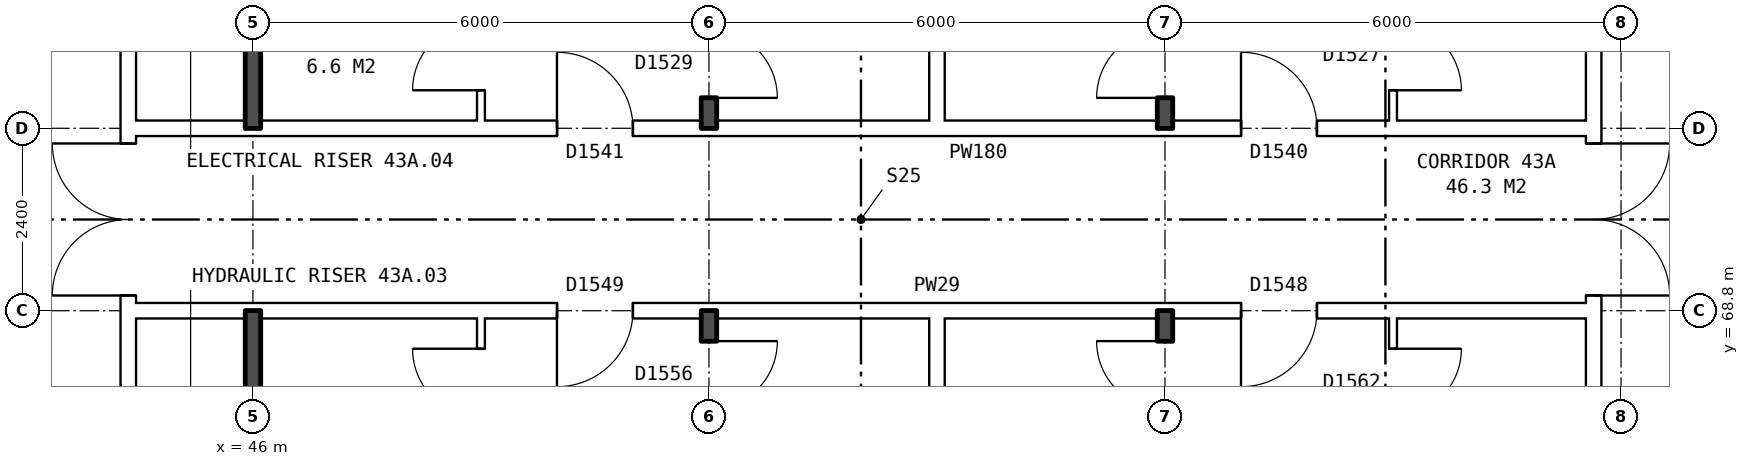
"""IFC4 building model, lengths in metres.
Left out: names, types, materials, properties, quantities, classifications, styles, units other than length and angle.
Written with IfcOpenShell. Run it as: python <this file> out.ifc"""

import sys

from ifc_helpers import new_model, si_unit, direction, frame, frame_2d, origin, place, context, subcontext, project, spatial, rectangle, extrude, element, fill, save


model = new_model("IFC4")
c1 = context("Model", 3, precision=1e-05, world=origin(), true_north=direction((0.0, 1.0)))
c2 = subcontext(c1, "Body", "Model", "MODEL_VIEW")
j1 = project(units=[si_unit("LENGTHUNIT", "METRE"), si_unit("PLANEANGLEUNIT", "RADIAN")], contexts=[c1])
p1 = place(None, origin())
s1 = spatial("IfcSite", under=j1, at=p1, CompositionType="ELEMENT")
p2 = place(p1, origin())
s2 = spatial("IfcBuilding", under=s1, at=p2, CompositionType="ELEMENT")
p3 = place(p2, frame((0.0, 0.0, 154.7)))
s3 = spatial("IfcBuildingStorey", under=s2, at=p3, CompositionType="ELEMENT", Elevation=154.7)
p4 = place(p3, frame((63.64, 63.9, 0.0), z_axis=(0.0, 0.0, 1.0), x_axis=(0.0, 1.0, 0.0)))
e1 = element("IfcWall", 1, at=p4, inside=s3, PredefinedType="PARTITIONING", context=c2, shape_type="SweptSolid", body=[
    extrude(rectangle(XDim=12.2, YDim=0.2, at=frame_2d((6.1, 0.0))), origin(), (0.0, 0.0, 1.0), 2.85),
])
p5 = place(p4, frame((5.1, 0.0, 0.0)))
e2 = element("IfcOpeningElement", 2, at=p5, cuts=e1, PredefinedType="OPENING", context=c2, shape_type="SweptSolid", body=[
    extrude(rectangle(XDim=2.0, YDim=2.1, at=frame_2d((1.0, 1.05))), frame((0.0, 0.11, 0.0), z_axis=(0.0, -1.0, 0.0), x_axis=(1.0, 0.0, 0.0)), (0.0, 0.0, 1.0), 0.22),
])
p6 = place(p3, frame((44.36, 63.9, 0.0), z_axis=(0.0, 0.0, 1.0), x_axis=(0.0, 1.0, 0.0)))
e3 = element("IfcWall", 3, at=p6, inside=s3, PredefinedType="PARTITIONING", context=c2, shape_type="SweptSolid", body=[
    extrude(rectangle(XDim=12.2, YDim=0.2, at=frame_2d((6.1, 0.0))), origin(), (0.0, 0.0, 1.0), 2.85),
])
p7 = place(p6, frame((5.1, 0.0, 0.0)))
e4 = element("IfcOpeningElement", 4, at=p7, cuts=e3, PredefinedType="OPENING", context=c2, shape_type="SweptSolid", body=[
    extrude(rectangle(XDim=2.0, YDim=2.1, at=frame_2d((1.0, 1.05))), frame((0.0, 0.11, 0.0), z_axis=(0.0, -1.0, 0.0), x_axis=(1.0, 0.0, 0.0)), (0.0, 0.0, 1.0), 0.22),
])
p8 = place(p3, frame((44.36, 68.8, 0.0), z_axis=(0.0, 0.0, 1.0), x_axis=(1.0, 0.0, 0.0)))
e5 = element("IfcWall", 5, at=p8, inside=s3, PredefinedType="PARTITIONING", context=c2, shape_type="SweptSolid", body=[
    extrude(rectangle(XDim=19.28, YDim=0.2, at=frame_2d((9.64, 0.0))), origin(), (0.0, 0.0, 1.0), 2.85),
])
p9 = place(p8, frame((14.64, 0.0, 0.0)))
e6 = element("IfcOpeningElement", 6, at=p9, cuts=e5, PredefinedType="OPENING", context=c2, shape_type="SweptSolid", body=[
    extrude(rectangle(XDim=1.0, YDim=2.1, at=frame_2d((0.5, 1.05))), frame((0.0, 0.11, 0.0), z_axis=(0.0, -1.0, 0.0), x_axis=(1.0, 0.0, 0.0)), (0.0, 0.0, 1.0), 0.22),
])
p10 = place(p8, frame((5.64, 0.0, 0.0)))
e7 = element("IfcOpeningElement", 7, at=p10, cuts=e5, PredefinedType="OPENING", context=c2, shape_type="SweptSolid", body=[
    extrude(rectangle(XDim=1.0, YDim=2.1, at=frame_2d((0.5, 1.05))), frame((0.0, 0.11, 0.0), z_axis=(0.0, -1.0, 0.0), x_axis=(1.0, 0.0, 0.0)), (0.0, 0.0, 1.0), 0.22),
])
p11 = place(p3, frame((44.36, 71.2, 0.0), z_axis=(0.0, 0.0, 1.0), x_axis=(1.0, 0.0, 0.0)))
e8 = element("IfcWall", 8, at=p11, inside=s3, PredefinedType="PARTITIONING", context=c2, shape_type="SweptSolid", body=[
    extrude(rectangle(XDim=19.28, YDim=0.2, at=frame_2d((9.64, 0.0))), origin(), (0.0, 0.0, 1.0), 2.85),
])
p12 = place(p11, frame((14.64, 0.0, 0.0)))
e9 = element("IfcOpeningElement", 9, at=p12, cuts=e8, PredefinedType="OPENING", context=c2, shape_type="SweptSolid", body=[
    extrude(rectangle(XDim=1.0, YDim=2.1, at=frame_2d((0.5, 1.05))), frame((0.0, 0.11, 0.0), z_axis=(0.0, -1.0, 0.0), x_axis=(1.0, 0.0, 0.0)), (0.0, 0.0, 1.0), 0.22),
])
p13 = place(p11, frame((5.64, 0.0, 0.0)))
e10 = element("IfcOpeningElement", 10, at=p13, cuts=e8, PredefinedType="OPENING", context=c2, shape_type="SweptSolid", body=[
    extrude(rectangle(XDim=1.0, YDim=2.1, at=frame_2d((0.5, 1.05))), frame((0.0, 0.11, 0.0), z_axis=(0.0, -1.0, 0.0), x_axis=(1.0, 0.0, 0.0)), (0.0, 0.0, 1.0), 0.22),
])
for number, where, z_axis, x_axis in (
    (11, (46.0, 63.8, 0.0), (0.0, 0.0, 1.0), (0.0, 1.0, 0.0)),
    (12, (46.0, 71.2, 0.0), (0.0, 0.0, 1.0), (0.0, 1.0, 0.0)),
):
    element("IfcWall", number, at=place(p3, frame(where, z_axis=z_axis, x_axis=x_axis)), inside=s3, PredefinedType="SOLIDWALL", context=c2, shape_type="SweptSolid", body=[
        extrude(rectangle(XDim=5.0, YDim=0.2, at=frame_2d((2.5, 0.0))), origin(), (0.0, 0.0, 1.0), 2.85),
    ])
p14 = place(p3, frame((49.0, 54.36, 0.0), z_axis=(0.0, 0.0, 1.0), x_axis=(0.0, 1.0, 0.0)))
e13 = element("IfcWall", 13, at=p14, inside=s3, PredefinedType="PARTITIONING", context=c2, shape_type="SweptSolid", body=[
    extrude(rectangle(XDim=14.34, YDim=0.1, at=frame_2d((7.17, 0.0))), origin(), (0.0, 0.0, 1.0), 2.85),
])
p15 = place(p14, frame((7.7, 0.0, 0.0)))
e14 = element("IfcOpeningElement", 14, at=p15, cuts=e13, PredefinedType="OPENING", context=c2, shape_type="SweptSolid", body=[
    extrude(rectangle(XDim=0.9, YDim=2.1, at=frame_2d((0.45, 1.05))), frame((0.0, 0.06, 0.0), z_axis=(0.0, -1.0, 0.0), x_axis=(1.0, 0.0, 0.0)), (0.0, 0.0, 1.0), 0.12),
])
p16 = place(p14, frame((13.04, 0.0, 0.0)))
e15 = element("IfcOpeningElement", 15, at=p16, cuts=e13, PredefinedType="OPENING", context=c2, shape_type="SweptSolid", body=[
    extrude(rectangle(XDim=0.9, YDim=2.1, at=frame_2d((0.45, 1.05))), frame((0.0, 0.06, 0.0), z_axis=(0.0, -1.0, 0.0), x_axis=(1.0, 0.0, 0.0)), (0.0, 0.0, 1.0), 0.12),
])
p17 = place(p3, frame((49.0, 71.3, 0.0), z_axis=(0.0, 0.0, 1.0), x_axis=(0.0, 1.0, 0.0)))
e16 = element("IfcWall", 16, at=p17, inside=s3, PredefinedType="PARTITIONING", context=c2, shape_type="SweptSolid", body=[
    extrude(rectangle(XDim=14.34, YDim=0.1, at=frame_2d((7.17, 0.0))), origin(), (0.0, 0.0, 1.0), 2.85),
])
p18 = place(p17, frame((5.74, 0.0, 0.0)))
e17 = element("IfcOpeningElement", 17, at=p18, cuts=e16, PredefinedType="OPENING", context=c2, shape_type="SweptSolid", body=[
    extrude(rectangle(XDim=0.9, YDim=2.1, at=frame_2d((0.45, 1.05))), frame((0.0, 0.06, 0.0), z_axis=(0.0, -1.0, 0.0), x_axis=(1.0, 0.0, 0.0)), (0.0, 0.0, 1.0), 0.12),
])
p19 = place(p17, frame((0.4, 0.0, 0.0)))
e18 = element("IfcOpeningElement", 18, at=p19, cuts=e16, PredefinedType="OPENING", context=c2, shape_type="SweptSolid", body=[
    extrude(rectangle(XDim=0.9, YDim=2.1, at=frame_2d((0.45, 1.05))), frame((0.0, 0.06, 0.0), z_axis=(0.0, -1.0, 0.0), x_axis=(1.0, 0.0, 0.0)), (0.0, 0.0, 1.0), 0.12),
])
p20 = place(p3, frame((52.0, 54.36, 0.0), z_axis=(0.0, 0.0, 1.0), x_axis=(0.0, 1.0, 0.0)))
e19 = element("IfcWall", 19, at=p20, inside=s3, PredefinedType="SOLIDWALL", context=c2, shape_type="SweptSolid", body=[
    extrude(rectangle(XDim=14.44, YDim=0.2, at=frame_2d((7.22, 0.0))), origin(), (0.0, 0.0, 1.0), 2.85),
])
p21 = place(p20, frame((7.7, 0.0, 0.0)))
e20 = element("IfcOpeningElement", 20, at=p21, cuts=e19, PredefinedType="OPENING", context=c2, shape_type="SweptSolid", body=[
    extrude(rectangle(XDim=0.9, YDim=2.1, at=frame_2d((0.45, 1.05))), frame((0.0, 0.11, 0.0), z_axis=(0.0, -1.0, 0.0), x_axis=(1.0, 0.0, 0.0)), (0.0, 0.0, 1.0), 0.22),
])
p22 = place(p20, frame((13.14, 0.0, 0.0)))
e21 = element("IfcOpeningElement", 21, at=p22, cuts=e19, PredefinedType="OPENING", context=c2, shape_type="SweptSolid", body=[
    extrude(rectangle(XDim=0.9, YDim=2.1, at=frame_2d((0.45, 1.05))), frame((0.0, 0.11, 0.0), z_axis=(0.0, -1.0, 0.0), x_axis=(1.0, 0.0, 0.0)), (0.0, 0.0, 1.0), 0.22),
])
p23 = place(p3, frame((52.0, 71.2, 0.0), z_axis=(0.0, 0.0, 1.0), x_axis=(0.0, 1.0, 0.0)))
e22 = element("IfcWall", 22, at=p23, inside=s3, PredefinedType="SOLIDWALL", context=c2, shape_type="SweptSolid", body=[
    extrude(rectangle(XDim=14.44, YDim=0.2, at=frame_2d((7.22, 0.0))), origin(), (0.0, 0.0, 1.0), 2.85),
])
p24 = place(p23, frame((5.84, 0.0, 0.0)))
e23 = element("IfcOpeningElement", 23, at=p24, cuts=e22, PredefinedType="OPENING", context=c2, shape_type="SweptSolid", body=[
    extrude(rectangle(XDim=0.9, YDim=2.1, at=frame_2d((0.45, 1.05))), frame((0.0, 0.11, 0.0), z_axis=(0.0, -1.0, 0.0), x_axis=(1.0, 0.0, 0.0)), (0.0, 0.0, 1.0), 0.22),
])
p25 = place(p23, frame((0.4, 0.0, 0.0)))
e24 = element("IfcOpeningElement", 24, at=p25, cuts=e22, PredefinedType="OPENING", context=c2, shape_type="SweptSolid", body=[
    extrude(rectangle(XDim=0.9, YDim=2.1, at=frame_2d((0.45, 1.05))), frame((0.0, 0.11, 0.0), z_axis=(0.0, -1.0, 0.0), x_axis=(1.0, 0.0, 0.0)), (0.0, 0.0, 1.0), 0.22),
])
for number, where, z_axis, x_axis in (
    (25, (55.0, 54.36, 0.0), (0.0, 0.0, 1.0), (0.0, 1.0, 0.0)),
    (26, (55.0, 71.3, 0.0), (0.0, 0.0, 1.0), (0.0, 1.0, 0.0)),
):
    element("IfcWall", number, at=place(p3, frame(where, z_axis=z_axis, x_axis=x_axis)), inside=s3, PredefinedType="PARTITIONING", context=c2, shape_type="SweptSolid", body=[
        extrude(rectangle(XDim=14.34, YDim=0.2, at=frame_2d((7.17, 0.0))), origin(), (0.0, 0.0, 1.0), 2.85),
    ])
p26 = place(p3, frame((58.0, 54.36, 0.0), z_axis=(0.0, 0.0, 1.0), x_axis=(0.0, 1.0, 0.0)))
e27 = element("IfcWall", 27, at=p26, inside=s3, PredefinedType="SOLIDWALL", context=c2, shape_type="SweptSolid", body=[
    extrude(rectangle(XDim=14.44, YDim=0.2, at=frame_2d((7.22, 0.0))), origin(), (0.0, 0.0, 1.0), 2.85),
])
p27 = place(p26, frame((7.7, 0.0, 0.0)))
e28 = element("IfcOpeningElement", 28, at=p27, cuts=e27, PredefinedType="OPENING", context=c2, shape_type="SweptSolid", body=[
    extrude(rectangle(XDim=0.9, YDim=2.1, at=frame_2d((0.45, 1.05))), frame((0.0, 0.11, 0.0), z_axis=(0.0, -1.0, 0.0), x_axis=(1.0, 0.0, 0.0)), (0.0, 0.0, 1.0), 0.22),
])
p28 = place(p26, frame((13.14, 0.0, 0.0)))
e29 = element("IfcOpeningElement", 29, at=p28, cuts=e27, PredefinedType="OPENING", context=c2, shape_type="SweptSolid", body=[
    extrude(rectangle(XDim=0.9, YDim=2.1, at=frame_2d((0.45, 1.05))), frame((0.0, 0.11, 0.0), z_axis=(0.0, -1.0, 0.0), x_axis=(1.0, 0.0, 0.0)), (0.0, 0.0, 1.0), 0.22),
])
p29 = place(p3, frame((58.0, 71.2, 0.0), z_axis=(0.0, 0.0, 1.0), x_axis=(0.0, 1.0, 0.0)))
e30 = element("IfcWall", 30, at=p29, inside=s3, PredefinedType="SOLIDWALL", context=c2, shape_type="SweptSolid", body=[
    extrude(rectangle(XDim=14.44, YDim=0.2, at=frame_2d((7.22, 0.0))), origin(), (0.0, 0.0, 1.0), 2.85),
])
p30 = place(p29, frame((5.84, 0.0, 0.0)))
e31 = element("IfcOpeningElement", 31, at=p30, cuts=e30, PredefinedType="OPENING", context=c2, shape_type="SweptSolid", body=[
    extrude(rectangle(XDim=0.9, YDim=2.1, at=frame_2d((0.45, 1.05))), frame((0.0, 0.11, 0.0), z_axis=(0.0, -1.0, 0.0), x_axis=(1.0, 0.0, 0.0)), (0.0, 0.0, 1.0), 0.22),
])
p31 = place(p29, frame((0.4, 0.0, 0.0)))
e32 = element("IfcOpeningElement", 32, at=p31, cuts=e30, PredefinedType="OPENING", context=c2, shape_type="SweptSolid", body=[
    extrude(rectangle(XDim=0.9, YDim=2.1, at=frame_2d((0.45, 1.05))), frame((0.0, 0.11, 0.0), z_axis=(0.0, -1.0, 0.0), x_axis=(1.0, 0.0, 0.0)), (0.0, 0.0, 1.0), 0.22),
])
p32 = place(p3, frame((61.0, 54.36, 0.0), z_axis=(0.0, 0.0, 1.0), x_axis=(0.0, 1.0, 0.0)))
e33 = element("IfcWall", 33, at=p32, inside=s3, PredefinedType="PARTITIONING", context=c2, shape_type="SweptSolid", body=[
    extrude(rectangle(XDim=14.34, YDim=0.1, at=frame_2d((7.17, 0.0))), origin(), (0.0, 0.0, 1.0), 2.85),
])
p33 = place(p32, frame((7.7, 0.0, 0.0)))
e34 = element("IfcOpeningElement", 34, at=p33, cuts=e33, PredefinedType="OPENING", context=c2, shape_type="SweptSolid", body=[
    extrude(rectangle(XDim=0.9, YDim=2.1, at=frame_2d((0.45, 1.05))), frame((0.0, 0.06, 0.0), z_axis=(0.0, -1.0, 0.0), x_axis=(1.0, 0.0, 0.0)), (0.0, 0.0, 1.0), 0.12),
])
p34 = place(p32, frame((13.04, 0.0, 0.0)))
e35 = element("IfcOpeningElement", 35, at=p34, cuts=e33, PredefinedType="OPENING", context=c2, shape_type="SweptSolid", body=[
    extrude(rectangle(XDim=0.9, YDim=2.1, at=frame_2d((0.45, 1.05))), frame((0.0, 0.06, 0.0), z_axis=(0.0, -1.0, 0.0), x_axis=(1.0, 0.0, 0.0)), (0.0, 0.0, 1.0), 0.12),
])
p35 = place(p3, frame((61.0, 71.3, 0.0), z_axis=(0.0, 0.0, 1.0), x_axis=(0.0, 1.0, 0.0)))
e36 = element("IfcWall", 36, at=p35, inside=s3, PredefinedType="PARTITIONING", context=c2, shape_type="SweptSolid", body=[
    extrude(rectangle(XDim=14.34, YDim=0.1, at=frame_2d((7.17, 0.0))), origin(), (0.0, 0.0, 1.0), 2.85),
])
p36 = place(p35, frame((5.74, 0.0, 0.0)))
e37 = element("IfcOpeningElement", 37, at=p36, cuts=e36, PredefinedType="OPENING", context=c2, shape_type="SweptSolid", body=[
    extrude(rectangle(XDim=0.9, YDim=2.1, at=frame_2d((0.45, 1.05))), frame((0.0, 0.06, 0.0), z_axis=(0.0, -1.0, 0.0), x_axis=(1.0, 0.0, 0.0)), (0.0, 0.0, 1.0), 0.12),
])
p37 = place(p35, frame((0.4, 0.0, 0.0)))
e38 = element("IfcOpeningElement", 38, at=p37, cuts=e36, PredefinedType="OPENING", context=c2, shape_type="SweptSolid", body=[
    extrude(rectangle(XDim=0.9, YDim=2.1, at=frame_2d((0.45, 1.05))), frame((0.0, 0.06, 0.0), z_axis=(0.0, -1.0, 0.0), x_axis=(1.0, 0.0, 0.0)), (0.0, 0.0, 1.0), 0.12),
])
p38 = place(p5, frame((2.0, 0.0, 0.0), z_axis=(0.0, 0.0, 1.0), x_axis=(-1.0, 0.0, 0.0)))
e39 = element("IfcDoor", 39, at=p38, inside=s3, OperationType="DOUBLE_DOOR_SINGLE_SWING", PredefinedType="DOOR", context=c2, shape_type="SweptSolid", body=[
    extrude(rectangle(XDim=2.0, YDim=2.1, at=frame_2d((1.0, 1.05))), frame((0.0, 0.025, 0.0), z_axis=(0.0, -1.0, 0.0), x_axis=(1.0, 0.0, 0.0)), (0.0, 0.0, 1.0), 0.05),
])
fill(e2, e39)
p39 = place(p7, origin())
e40 = element("IfcDoor", 40, at=p39, inside=s3, OperationType="DOUBLE_DOOR_SINGLE_SWING", PredefinedType="DOOR", context=c2, shape_type="SweptSolid", body=[
    extrude(rectangle(XDim=2.0, YDim=2.1, at=frame_2d((1.0, 1.05))), frame((0.0, 0.025, 0.0), z_axis=(0.0, -1.0, 0.0), x_axis=(1.0, 0.0, 0.0)), (0.0, 0.0, 1.0), 0.05),
])
fill(e4, e40)
p40 = place(p9, frame((1.0, 0.0, 0.0), z_axis=(0.0, 0.0, 1.0), x_axis=(-1.0, 0.0, 0.0)))
e41 = element("IfcDoor", 41, at=p40, inside=s3, OperationType="SINGLE_SWING_RIGHT", PredefinedType="DOOR", context=c2, shape_type="SweptSolid", body=[
    extrude(rectangle(XDim=1.0, YDim=2.1, at=frame_2d((0.5, 1.05))), frame((0.0, 0.025, 0.0), z_axis=(0.0, -1.0, 0.0), x_axis=(1.0, 0.0, 0.0)), (0.0, 0.0, 1.0), 0.05),
])
fill(e6, e41)
p41 = place(p34, frame((0.9, 0.0, 0.0), z_axis=(0.0, 0.0, 1.0), x_axis=(-1.0, 0.0, 0.0)))
e42 = element("IfcDoor", 42, at=p41, inside=s3, OperationType="SINGLE_SWING_LEFT", PredefinedType="DOOR", context=c2, shape_type="SweptSolid", body=[
    extrude(rectangle(XDim=0.9, YDim=2.1, at=frame_2d((0.45, 1.05))), frame((0.0, 0.025, 0.0), z_axis=(0.0, -1.0, 0.0), x_axis=(1.0, 0.0, 0.0)), (0.0, 0.0, 1.0), 0.05),
])
fill(e35, e42)
p42 = place(p28, origin())
e43 = element("IfcDoor", 43, at=p42, inside=s3, OperationType="SINGLE_SWING_RIGHT", PredefinedType="DOOR", context=c2, shape_type="SweptSolid", body=[
    extrude(rectangle(XDim=0.9, YDim=2.1, at=frame_2d((0.45, 1.05))), frame((0.0, 0.025, 0.0), z_axis=(0.0, -1.0, 0.0), x_axis=(1.0, 0.0, 0.0)), (0.0, 0.0, 1.0), 0.05),
])
fill(e29, e43)
p43 = place(p10, frame((1.0, 0.0, 0.0), z_axis=(0.0, 0.0, 1.0), x_axis=(-1.0, 0.0, 0.0)))
e44 = element("IfcDoor", 44, at=p43, inside=s3, OperationType="SINGLE_SWING_RIGHT", PredefinedType="DOOR", context=c2, shape_type="SweptSolid", body=[
    extrude(rectangle(XDim=1.0, YDim=2.1, at=frame_2d((0.5, 1.05))), frame((0.0, 0.025, 0.0), z_axis=(0.0, -1.0, 0.0), x_axis=(1.0, 0.0, 0.0)), (0.0, 0.0, 1.0), 0.05),
])
fill(e7, e44)
p44 = place(p22, frame((0.9, 0.0, 0.0), z_axis=(0.0, 0.0, 1.0), x_axis=(-1.0, 0.0, 0.0)))
e45 = element("IfcDoor", 45, at=p44, inside=s3, OperationType="SINGLE_SWING_LEFT", PredefinedType="DOOR", context=c2, shape_type="SweptSolid", body=[
    extrude(rectangle(XDim=0.9, YDim=2.1, at=frame_2d((0.45, 1.05))), frame((0.0, 0.025, 0.0), z_axis=(0.0, -1.0, 0.0), x_axis=(1.0, 0.0, 0.0)), (0.0, 0.0, 1.0), 0.05),
])
fill(e21, e45)
p45 = place(p16, origin())
e46 = element("IfcDoor", 46, at=p45, inside=s3, OperationType="SINGLE_SWING_RIGHT", PredefinedType="DOOR", context=c2, shape_type="SweptSolid", body=[
    extrude(rectangle(XDim=0.9, YDim=2.1, at=frame_2d((0.45, 1.05))), frame((0.0, 0.025, 0.0), z_axis=(0.0, -1.0, 0.0), x_axis=(1.0, 0.0, 0.0)), (0.0, 0.0, 1.0), 0.05),
])
fill(e15, e46)
p46 = place(p12, origin())
e47 = element("IfcDoor", 47, at=p46, inside=s3, OperationType="SINGLE_SWING_LEFT", PredefinedType="DOOR", context=c2, shape_type="SweptSolid", body=[
    extrude(rectangle(XDim=1.0, YDim=2.1, at=frame_2d((0.5, 1.05))), frame((0.0, 0.025, 0.0), z_axis=(0.0, -1.0, 0.0), x_axis=(1.0, 0.0, 0.0)), (0.0, 0.0, 1.0), 0.05),
])
fill(e9, e47)
p47 = place(p37, frame((0.9, 0.0, 0.0), z_axis=(0.0, 0.0, 1.0), x_axis=(-1.0, 0.0, 0.0)))
e48 = element("IfcDoor", 48, at=p47, inside=s3, OperationType="SINGLE_SWING_RIGHT", PredefinedType="DOOR", context=c2, shape_type="SweptSolid", body=[
    extrude(rectangle(XDim=0.9, YDim=2.1, at=frame_2d((0.45, 1.05))), frame((0.0, 0.025, 0.0), z_axis=(0.0, -1.0, 0.0), x_axis=(1.0, 0.0, 0.0)), (0.0, 0.0, 1.0), 0.05),
])
fill(e38, e48)
p48 = place(p31, origin())
e49 = element("IfcDoor", 49, at=p48, inside=s3, OperationType="SINGLE_SWING_LEFT", PredefinedType="DOOR", context=c2, shape_type="SweptSolid", body=[
    extrude(rectangle(XDim=0.9, YDim=2.1, at=frame_2d((0.45, 1.05))), frame((0.0, 0.025, 0.0), z_axis=(0.0, -1.0, 0.0), x_axis=(1.0, 0.0, 0.0)), (0.0, 0.0, 1.0), 0.05),
])
fill(e32, e49)
p49 = place(p13, origin())
e50 = element("IfcDoor", 50, at=p49, inside=s3, OperationType="SINGLE_SWING_LEFT", PredefinedType="DOOR", context=c2, shape_type="SweptSolid", body=[
    extrude(rectangle(XDim=1.0, YDim=2.1, at=frame_2d((0.5, 1.05))), frame((0.0, 0.025, 0.0), z_axis=(0.0, -1.0, 0.0), x_axis=(1.0, 0.0, 0.0)), (0.0, 0.0, 1.0), 0.05),
])
fill(e10, e50)
p50 = place(p25, frame((0.9, 0.0, 0.0), z_axis=(0.0, 0.0, 1.0), x_axis=(-1.0, 0.0, 0.0)))
e51 = element("IfcDoor", 51, at=p50, inside=s3, OperationType="SINGLE_SWING_RIGHT", PredefinedType="DOOR", context=c2, shape_type="SweptSolid", body=[
    extrude(rectangle(XDim=0.9, YDim=2.1, at=frame_2d((0.45, 1.05))), frame((0.0, 0.025, 0.0), z_axis=(0.0, -1.0, 0.0), x_axis=(1.0, 0.0, 0.0)), (0.0, 0.0, 1.0), 0.05),
])
fill(e24, e51)
p51 = place(p19, origin())
e52 = element("IfcDoor", 52, at=p51, inside=s3, OperationType="SINGLE_SWING_LEFT", PredefinedType="DOOR", context=c2, shape_type="SweptSolid", body=[
    extrude(rectangle(XDim=0.9, YDim=2.1, at=frame_2d((0.45, 1.05))), frame((0.0, 0.025, 0.0), z_axis=(0.0, -1.0, 0.0), x_axis=(1.0, 0.0, 0.0)), (0.0, 0.0, 1.0), 0.05),
])
fill(e18, e52)
save(model, sys.argv[1])
